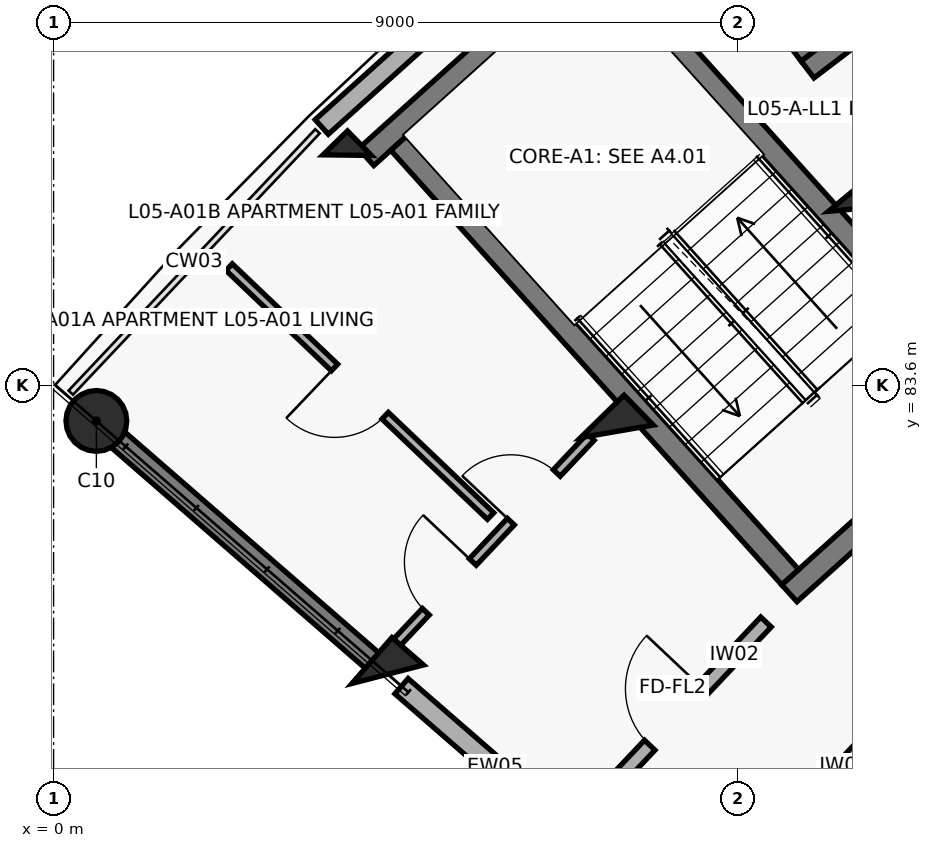
"""IFC4 building model, lengths in metres.
Left out: names, types, materials, properties, quantities, classifications, styles, units other than length and angle.
Written with IfcOpenShell. Run it as: python <this file> out.ifc"""

import sys

from ifc_helpers import new_model, si_unit, direction, frame, frame_2d, origin, origin_2d, place, context, subcontext, project, spatial, rectangle, circle, extrude, element, fill, save


model = new_model("IFC4")
c1 = context("Model", 3, precision=1e-05, world=origin(), true_north=direction((0.0, 1.0)))
c2 = subcontext(c1, "Body", "Model", "MODEL_VIEW")
j1 = project(units=[si_unit("LENGTHUNIT", "METRE"), si_unit("PLANEANGLEUNIT", "RADIAN")], contexts=[c1])
p1 = place(None, origin())
s1 = spatial("IfcSite", under=j1, at=p1, CompositionType="ELEMENT")
p2 = place(p1, origin())
s2 = spatial("IfcBuilding", under=s1, at=p2, CompositionType="ELEMENT")
p3 = place(p2, frame((0.0, 0.0, 17.4)))
s3 = spatial("IfcBuildingStorey", under=s2, at=p3, CompositionType="ELEMENT", Elevation=17.4)
p4 = place(p3, frame((4.397, 79.796, 0.0), z_axis=(0.0, 0.0, 1.0), x_axis=(-0.754709580223, 0.656059028991, 0.0)))
e1 = element("IfcColumn", 1, at=p4, inside=s3, PredefinedType="COLUMN", context=c2, shape_type="SweptSolid", body=[
    extrude(rectangle(XDim=0.55, YDim=0.8, at=origin_2d()), origin(), (0.0, 0.0, 1.0), 3.1),
])
p5 = place(p3, frame((0.563, 83.129, 0.0), z_axis=(0.0, 0.0, 1.0), x_axis=(-0.754709580223, 0.656059028991, 0.0)))
e2 = element("IfcColumn", 2, at=p5, inside=s3, PredefinedType="COLUMN", context=c2, shape_type="SweptSolid", body=[
    extrude(circle(Radius=0.4, at=origin_2d()), origin(), (0.0, 0.0, 1.0), 3.1),
])
p6 = place(p3, frame((7.412, 82.991, 0.0), z_axis=(0.0, 0.0, 1.0), x_axis=(-0.698665066769, 0.715448897181, 0.0)))
e3 = element("IfcColumn", 3, at=p6, inside=s3, PredefinedType="COLUMN", context=c2, shape_type="SweptSolid", body=[
    extrude(rectangle(XDim=0.55, YDim=0.8, at=origin_2d()), origin(), (0.0, 0.0, 1.0), 3.1),
])
p7 = place(p3, frame((3.863, 86.626, 0.0), z_axis=(0.0, 0.0, 1.0), x_axis=(-0.698665066769, 0.715448897181, 0.0)))
e4 = element("IfcColumn", 4, at=p7, inside=s3, PredefinedType="COLUMN", context=c2, shape_type="SweptSolid", body=[
    extrude(rectangle(XDim=0.45, YDim=0.45, at=origin_2d()), origin(), (0.0, 0.0, 1.0), 3.1),
])
p8 = place(p3, frame((10.678, 85.93, 0.0), z_axis=(0.0, 0.0, 1.0), x_axis=(-0.637961754089, 0.770068049148, 0.0)))
e5 = element("IfcColumn", 5, at=p8, inside=s3, PredefinedType="COLUMN", context=c2, shape_type="SweptSolid", body=[
    extrude(rectangle(XDim=0.55, YDim=0.8, at=origin_2d()), origin(), (0.0, 0.0, 1.0), 3.1),
])
p9 = place(p3, frame((4.261, 79.914, 0.0), z_axis=(0.0, 0.0, 1.0), x_axis=(-0.754703505217, 0.65606601742, 0.0)))
e6 = element("IfcWall", 6, at=p9, inside=s3, PredefinedType="SHEAR", context=c2, shape_type="SweptSolid", body=[
    extrude(rectangle(XDim=4.72, YDim=0.27, at=frame_2d((2.36, 0.0))), origin(), (0.0, 0.0, 1.0), 2.86),
])
p10 = place(p3, frame((3.528, 86.997, 0.0), z_axis=(0.0, 0.0, 1.0), x_axis=(0.743387539862, 0.668860946369, 0.0)))
e7 = element("IfcWall", 7, at=p10, inside=s3, PredefinedType="SOLIDWALL", context=c2, shape_type="SweptSolid", body=[
    extrude(rectangle(XDim=4.809, YDim=0.258, at=frame_2d((2.405, 0.0))), origin(), (0.0, 0.0, 1.0), 2.25),
])
p11 = place(p3, frame((10.766, 74.259, 0.0), z_axis=(0.0, 0.0, 1.0), x_axis=(-0.754717680958, 0.656049710044, 0.0)))
e8 = element("IfcWall", 8, at=p11, inside=s3, PredefinedType="SOLIDWALL", context=c2, shape_type="SweptSolid", body=[
    extrude(rectangle(XDim=8.2, YDim=0.265, at=frame_2d((4.1, 0.0))), origin(), (0.0, 0.0, 1.0), 2.18),
])
p12 = place(p11, frame((3.59, 0.0, 0.75)))
e9 = element("IfcOpeningElement", 9, at=p12, cuts=e8, PredefinedType="OPENING", context=c2, shape_type="SweptSolid", body=[
    extrude(rectangle(XDim=1.35, YDim=1.35, at=frame_2d((0.675, 0.675))), frame((0.0, 0.142, 0.0), z_axis=(0.0, -1.0, 0.0), x_axis=(1.0, 0.0, 0.0)), (0.0, 0.0, 1.0), 0.285),
])
p13 = place(p3, frame((12.557, 83.45, 0.0), z_axis=(0.0, 0.0, 1.0), x_axis=(-0.743375696158, -0.668874109501, 0.0)))
e10 = element("IfcWall", 10, at=p13, inside=s3, PredefinedType="SHEAR", context=c2, shape_type="SweptSolid", body=[
    extrude(rectangle(XDim=3.87, YDim=0.3, at=frame_2d((1.935, 0.0))), origin(), (0.0, 0.0, 1.0), 3.1),
])
p14 = place(p13, frame((1.435, 0.0, 0.0)))
e11 = element("IfcOpeningElement", 11, at=p14, cuts=e10, PredefinedType="OPENING", context=c2, shape_type="SweptSolid", body=[
    extrude(rectangle(XDim=1.0, YDim=2.15, at=frame_2d((0.5, 1.075))), frame((0.0, 0.16, 0.0), z_axis=(0.0, -1.0, 0.0), x_axis=(1.0, 0.0, 0.0)), (0.0, 0.0, 1.0), 0.32),
])
p15 = place(p3, frame((7.436, 89.59, 0.0), z_axis=(0.0, 0.0, 1.0), x_axis=(-0.743400052815, -0.668847038922, 0.0)))
e12 = element("IfcWall", 12, at=p15, inside=s3, PredefinedType="SHEAR", context=c2, shape_type="SweptSolid", body=[
    extrude(rectangle(XDim=4.47, YDim=0.3, at=frame_2d((2.235, 0.0))), origin(), (0.0, 0.0, 1.0), 3.1),
])
p16 = place(p3, frame((12.345, 83.461, 0.0), z_axis=(0.0, 0.0, 1.0), x_axis=(-0.668868253964, 0.743380964808, 0.0)))
e13 = element("IfcWall", 13, at=p16, inside=s3, PredefinedType="SHEAR", context=c2, shape_type="SweptSolid", body=[
    extrude(rectangle(XDim=7.69, YDim=0.3, at=frame_2d((3.845, 0.0))), origin(), (0.0, 0.0, 1.0), 3.1),
])
p17 = place(p3, frame((9.691, 81.073, 0.0), z_axis=(0.0, 0.0, 1.0), x_axis=(-0.668885797871, 0.743365179038, 0.0)))
e14 = element("IfcWall", 14, at=p17, inside=s3, PredefinedType="SHEAR", context=c2, shape_type="SweptSolid", body=[
    extrude(rectangle(XDim=7.69, YDim=0.3, at=frame_2d((3.845, 0.0))), origin(), (0.0, 0.0, 1.0), 3.1),
])
p18 = place(p3, frame((12.616, 89.807, 0.0), z_axis=(0.0, 0.0, 1.0), x_axis=(-0.795474703455, -0.605986795371, 0.0)))
e15 = element("IfcWall", 15, at=p18, inside=s3, PredefinedType="SHEAR", context=c2, shape_type="SweptSolid", body=[
    extrude(rectangle(XDim=3.39, YDim=0.28, at=frame_2d((1.695, 0.0))), origin(), (0.0, 0.0, 1.0), 3.1),
])
p19 = place(p18, frame((1.095, 0.0, 0.0)))
e16 = element("IfcOpeningElement", 16, at=p19, cuts=e15, PredefinedType="OPENING", context=c2, shape_type="SweptSolid", body=[
    extrude(rectangle(XDim=1.2, YDim=2.15, at=frame_2d((0.6, 1.075))), frame((0.0, 0.15, 0.0), z_axis=(0.0, -1.0, 0.0), x_axis=(1.0, 0.0, 0.0)), (0.0, 0.0, 1.0), 0.3),
])
p20 = place(p3, frame((9.946, 87.949, 0.0), z_axis=(0.0, 0.0, 1.0), x_axis=(-0.605891019062, 0.795547656033, 0.0)))
e17 = element("IfcWall", 17, at=p20, inside=s3, PredefinedType="SHEAR", context=c2, shape_type="SweptSolid", body=[
    extrude(rectangle(XDim=2.03, YDim=0.28, at=frame_2d((1.015, 0.0))), origin(), (0.0, 0.0, 1.0), 3.1),
])
p21 = place(p3, frame((7.014, 77.984, 0.0), z_axis=(0.0, 0.0, 1.0), x_axis=(0.686310507227, 0.727308660522, 0.0)))
e18 = element("IfcWall", 18, at=p21, inside=s3, PredefinedType="SOLIDWALL", context=c2, shape_type="SweptSolid", body=[
    extrude(rectangle(XDim=3.436, YDim=0.19, at=frame_2d((1.718, 0.0))), origin(), (0.0, 0.0, 1.0), 2.08),
])
p22 = place(p21, frame((1.208, 0.0, 0.0)))
e19 = element("IfcOpeningElement", 19, at=p22, cuts=e18, PredefinedType="OPENING", context=c2, shape_type="SweptSolid", body=[
    extrude(rectangle(XDim=1.02, YDim=2.15, at=frame_2d((0.51, 1.075))), frame((0.0, 0.105, 0.0), z_axis=(0.0, -1.0, 0.0), x_axis=(1.0, 0.0, 0.0)), (0.0, 0.0, 1.0), 0.21),
])
p23 = place(p3, frame((8.561, 76.639, 0.0), z_axis=(0.0, 0.0, 1.0), x_axis=(0.686307658735, 0.727311348434, 0.0)))
e20 = element("IfcWall", 20, at=p23, inside=s3, PredefinedType="SOLIDWALL", context=c2, shape_type="SweptSolid", body=[
    extrude(rectangle(XDim=3.269, YDim=0.19, at=frame_2d((1.634, 0.0))), origin(), (0.0, 0.0, 1.0), 2.08),
])
p24 = place(p23, frame((1.174, 0.0, 0.0)))
e21 = element("IfcOpeningElement", 21, at=p24, cuts=e20, PredefinedType="OPENING", context=c2, shape_type="SweptSolid", body=[
    extrude(rectangle(XDim=0.92, YDim=2.1, at=frame_2d((0.46, 1.05))), frame((0.0, 0.105, 0.0), z_axis=(0.0, -1.0, 0.0), x_axis=(1.0, 0.0, 0.0)), (0.0, 0.0, 1.0), 0.21),
])
p25 = place(p3, frame((4.452, 80.145, 0.0), z_axis=(0.0, 0.0, 1.0), x_axis=(0.686301674417, 0.727316995327, 0.0)))
e22 = element("IfcWall", 22, at=p25, inside=s3, PredefinedType="PARTITIONING", context=c2, shape_type="SweptSolid", body=[
    extrude(rectangle(XDim=3.81, YDim=0.125, at=frame_2d((1.905, 0.0))), origin(), (0.0, 0.0, 1.0), 2.08),
])
p26 = place(p25, frame((0.65, 0.0, 0.0)))
e23 = element("IfcOpeningElement", 23, at=p26, cuts=e22, PredefinedType="OPENING", context=c2, shape_type="SweptSolid", body=[
    extrude(rectangle(XDim=0.9, YDim=2.1, at=frame_2d((0.45, 1.05))), frame((0.0, 0.073, 0.0), z_axis=(0.0, -1.0, 0.0), x_axis=(1.0, 0.0, 0.0)), (0.0, 0.0, 1.0), 0.145),
])
p27 = place(p25, frame((2.28, 0.0, 0.0)))
e24 = element("IfcOpeningElement", 24, at=p27, cuts=e22, PredefinedType="OPENING", context=c2, shape_type="SweptSolid", body=[
    extrude(rectangle(XDim=0.88, YDim=2.1, at=frame_2d((0.44, 1.05))), frame((0.0, 0.073, 0.0), z_axis=(0.0, -1.0, 0.0), x_axis=(1.0, 0.0, 0.0)), (0.0, 0.0, 1.0), 0.145),
])
p28 = place(p3, frame((5.749, 81.877, 0.0), z_axis=(0.0, 0.0, 1.0), x_axis=(-0.724140375623, 0.689652605587, 0.0)))
e25 = element("IfcWall", 25, at=p28, inside=s3, PredefinedType="PARTITIONING", context=c2, shape_type="SweptSolid", body=[
    extrude(rectangle(XDim=4.75, YDim=0.12, at=frame_2d((2.375, 0.0))), origin(), (0.0, 0.0, 1.0), 2.08),
])
p29 = place(p28, frame((1.915, 0.0, 0.0)))
e26 = element("IfcOpeningElement", 26, at=p29, cuts=e25, PredefinedType="OPENING", context=c2, shape_type="SweptSolid", body=[
    extrude(rectangle(XDim=0.92, YDim=2.1, at=frame_2d((0.46, 1.05))), frame((0.0, 0.07, 0.0), z_axis=(0.0, -1.0, 0.0), x_axis=(1.0, 0.0, 0.0)), (0.0, 0.0, 1.0), 0.14),
])
p30 = place(p22, origin())
e27 = element("IfcDoor", 27, at=p30, inside=s3, OperationType="SINGLE_SWING_RIGHT", PredefinedType="DOOR", context=c2, shape_type="SweptSolid", body=[
    extrude(rectangle(XDim=1.02, YDim=2.15, at=frame_2d((0.51, 1.075))), frame((0.0, 0.025, 0.0), z_axis=(0.0, -1.0, 0.0), x_axis=(1.0, 0.0, 0.0)), (0.0, 0.0, 1.0), 0.05),
])
fill(e19, e27)
p31 = place(p26, origin())
e28 = element("IfcDoor", 28, at=p31, inside=s3, OperationType="SINGLE_SWING_RIGHT", PredefinedType="DOOR", context=c2, shape_type="SweptSolid", body=[
    extrude(rectangle(XDim=0.9, YDim=2.1, at=frame_2d((0.45, 1.05))), frame((0.0, 0.025, 0.0), z_axis=(0.0, -1.0, 0.0), x_axis=(1.0, 0.0, 0.0)), (0.0, 0.0, 1.0), 0.05),
])
fill(e23, e28)
p32 = place(p27, origin())
e29 = element("IfcDoor", 29, at=p32, inside=s3, OperationType="SINGLE_SWING_LEFT", PredefinedType="DOOR", context=c2, shape_type="SweptSolid", body=[
    extrude(rectangle(XDim=0.88, YDim=2.1, at=frame_2d((0.44, 1.05))), frame((0.0, 0.025, 0.0), z_axis=(0.0, -1.0, 0.0), x_axis=(1.0, 0.0, 0.0)), (0.0, 0.0, 1.0), 0.05),
])
fill(e24, e29)
p33 = place(p29, origin())
e30 = element("IfcDoor", 30, at=p33, inside=s3, OperationType="SINGLE_SWING_RIGHT", PredefinedType="DOOR", context=c2, shape_type="SweptSolid", body=[
    extrude(rectangle(XDim=0.92, YDim=2.1, at=frame_2d((0.46, 1.05))), frame((0.0, 0.025, 0.0), z_axis=(0.0, -1.0, 0.0), x_axis=(1.0, 0.0, 0.0)), (0.0, 0.0, 1.0), 0.05),
])
fill(e26, e30)
save(model, sys.argv[1])
